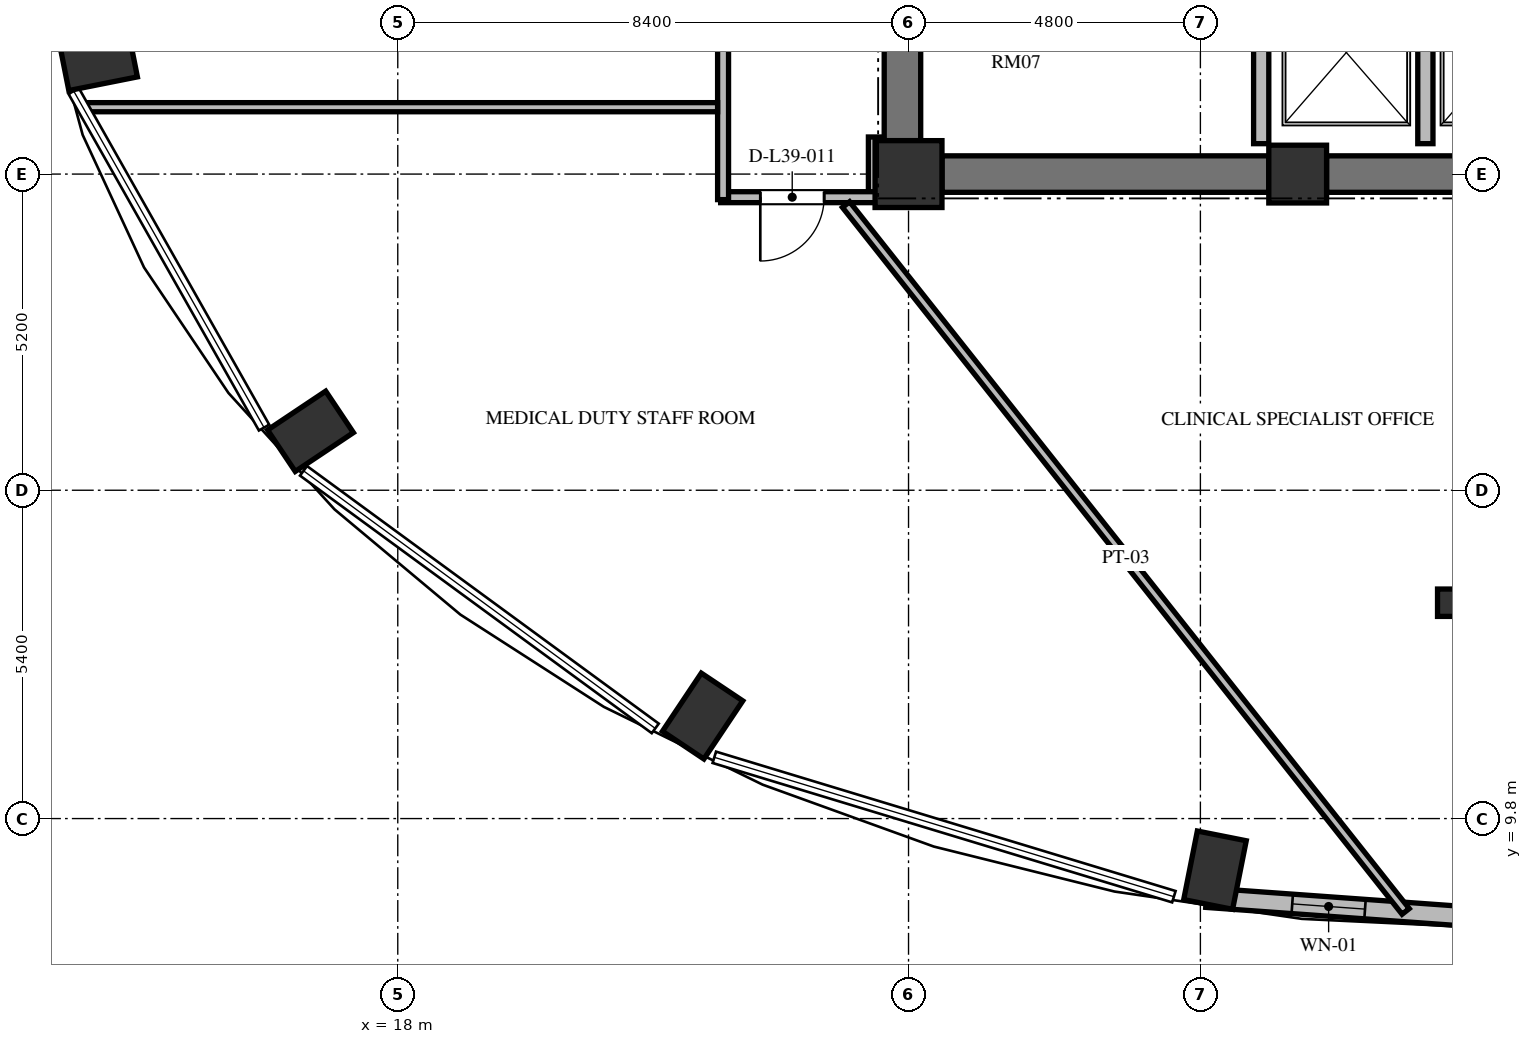
"""IFC4 building model, lengths in metres.
Left out: names, types, materials, properties, quantities, classifications, styles, units other than length and angle.
Written with IfcOpenShell. Run it as: python <this file> out.ifc"""

import sys

from ifc_helpers import new_model, si_unit, direction, frame, frame_2d, origin, origin_2d, place, context, subcontext, project, spatial, rectangle, extrude, element, fill, save


model = new_model("IFC4")
c1 = context("Model", 3, precision=1e-05, world=origin(), true_north=direction((0.0, 1.0)))
c2 = subcontext(c1, "Body", "Model", "MODEL_VIEW")
j1 = project(units=[si_unit("LENGTHUNIT", "METRE"), si_unit("PLANEANGLEUNIT", "RADIAN")], contexts=[c1])
p1 = place(None, origin())
s1 = spatial("IfcSite", under=j1, at=p1, CompositionType="ELEMENT")
p2 = place(p1, origin())
s2 = spatial("IfcBuilding", under=s1, at=p2, CompositionType="ELEMENT")
p3 = place(p2, frame((0.0, 0.0, 152.88)))
s3 = spatial("IfcBuildingStorey", under=s2, at=p3, CompositionType="ELEMENT", Elevation=152.88)
for number, where, z_axis, x_axis in (
    (1, (13.074, 22.288, 0.0), (0.0, 0.0, 1.0), (-0.981, -0.195, 0.0)),
    (2, (16.564, 16.169, 0.0), (0.0, 0.0, 1.0), (-0.831, -0.556, 0.0)),
    (3, (23.013, 11.486, 0.0), (0.0, 0.0, 1.0), (-0.556, -0.831, 0.0)),
    (4, (31.44, 8.951, 0.0), (0.0, 0.0, 1.0), (-0.195, -0.981, 0.0)),
):
    element("IfcColumn", number, at=place(p3, frame(where, z_axis=z_axis, x_axis=x_axis)), inside=s3, PredefinedType="COLUMN", context=c2, shape_type="SweptSolid", body=[
        extrude(rectangle(XDim=1.15, YDim=0.82, at=origin_2d()), origin(), (0.0, 0.0, 1.0), 3.648),
    ])
p4 = place(p3, frame((26.4, 20.4, 0.0), z_axis=(0.0, 0.0, 1.0), x_axis=(1.0, 0.0, 0.0)))
e5 = element("IfcColumn", 5, at=p4, inside=s3, PredefinedType="COLUMN", context=c2, shape_type="SweptSolid", body=[
    extrude(rectangle(XDim=1.1, YDim=1.1, at=origin_2d()), origin(), (0.0, 0.0, 1.0), 3.648),
])
p5 = place(p3, frame((32.8, 20.4, 0.0), z_axis=(0.0, 0.0, 1.0), x_axis=(1.0, 0.0, 0.0)))
e6 = element("IfcColumn", 6, at=p5, inside=s3, PredefinedType="COLUMN", context=c2, shape_type="SweptSolid", body=[
    extrude(rectangle(XDim=0.95, YDim=0.95, at=origin_2d()), origin(), (0.0, 0.0, 1.0), 3.648),
])
p6 = place(p3, frame((35.4, 13.35, 0.0), z_axis=(0.0, 0.0, 1.0), x_axis=(1.0, 0.0, 0.0)))
e7 = element("IfcColumn", 7, at=p6, inside=s3, PredefinedType="PILASTER", context=c2, shape_type="SweptSolid", body=[
    extrude(rectangle(XDim=0.6, YDim=0.45, at=origin_2d()), origin(), (0.0, 0.0, 1.0), 3.648),
])
p7 = place(p3, frame((26.3, 20.95, 0.0), z_axis=(0.0, 0.0, 1.0), x_axis=(0.0, 1.0, 0.0)))
e8 = element("IfcWall", 8, at=p7, inside=s3, PredefinedType="SHEAR", context=c2, shape_type="SweptSolid", body=[
    extrude(rectangle(XDim=14.1, YDim=0.6, at=frame_2d((7.05, 0.0))), origin(), (0.0, 0.0, 1.0), 3.648),
])
p8 = place(p7, frame((6.5, 0.0, 0.0)))
e9 = element("IfcOpeningElement", 9, at=p8, cuts=e8, PredefinedType="OPENING", context=c2, shape_type="SweptSolid", body=[
    extrude(rectangle(XDim=1.2, YDim=2.15, at=frame_2d((0.6, 1.075))), frame((0.0, 0.31, 0.0), z_axis=(0.0, -1.0, 0.0), x_axis=(1.0, 0.0, 0.0)), (0.0, 0.0, 1.0), 0.62),
])
p9 = place(p7, frame((9.6, 0.0, 0.0)))
e10 = element("IfcOpeningElement", 10, at=p9, cuts=e8, PredefinedType="OPENING", context=c2, shape_type="SweptSolid", body=[
    extrude(rectangle(XDim=1.3, YDim=2.2, at=frame_2d((0.65, 1.1))), frame((0.0, 0.31, 0.0), z_axis=(0.0, -1.0, 0.0), x_axis=(1.0, 0.0, 0.0)), (0.0, 0.0, 1.0), 0.62),
])
p10 = place(p7, frame((3.26, 0.0, 0.0)))
e11 = element("IfcOpeningElement", 11, at=p10, cuts=e8, PredefinedType="OPENING", context=c2, shape_type="SweptSolid", body=[
    extrude(rectangle(XDim=1.3, YDim=2.2, at=frame_2d((0.65, 1.1))), frame((0.0, 0.31, 0.0), z_axis=(0.0, -1.0, 0.0), x_axis=(1.0, 0.0, 0.0)), (0.0, 0.0, 1.0), 0.62),
])
p11 = place(p3, frame((26.95, 20.4, 0.0), z_axis=(0.0, 0.0, 1.0), x_axis=(1.0, 0.0, 0.0)))
e12 = element("IfcWall", 12, at=p11, inside=s3, PredefinedType="SHEAR", context=c2, shape_type="SweptSolid", body=[
    extrude(rectangle(XDim=5.375, YDim=0.6, at=frame_2d((2.688, 0.0))), origin(), (0.0, 0.0, 1.0), 3.648),
])
p12 = place(p3, frame((33.275, 20.4, 0.0), z_axis=(0.0, 0.0, 1.0), x_axis=(1.0, 0.0, 0.0)))
e13 = element("IfcWall", 13, at=p12, inside=s3, PredefinedType="SHEAR", context=c2, shape_type="SweptSolid", body=[
    extrude(rectangle(XDim=5.45, YDim=0.6, at=frame_2d((2.725, 0.0))), origin(), (0.0, 0.0, 1.0), 3.648),
])
p13 = place(p3, frame((31.299, 8.499, 0.0), z_axis=(0.0, 0.0, 1.0), x_axis=(0.997415202861, -0.071853413984, 0.0)))
e14 = element("IfcWall", 14, at=p13, inside=s3, PredefinedType="SOLIDWALL", context=c2, shape_type="SweptSolid", body=[
    extrude(rectangle(XDim=4.893, YDim=0.32, at=frame_2d((2.446, 0.0))), origin(), (0.0, 0.0, 1.0), 3.428),
])
p14 = place(p13, frame((1.415, 0.0, 0.85)))
e15 = element("IfcOpeningElement", 15, at=p14, cuts=e14, PredefinedType="OPENING", context=c2, shape_type="SweptSolid", body=[
    extrude(rectangle(XDim=1.2, YDim=2.2, at=frame_2d((0.6, 1.1))), frame((0.0, 0.17, 0.0), z_axis=(0.0, -1.0, 0.0), x_axis=(1.0, 0.0, 0.0)), (0.0, 0.0, 1.0), 0.34),
])
for number, where, z_axis, x_axis in (
    (16, (32.2, 20.9, 0.0), (0.0, 0.0, 1.0), (0.0, 1.0, 0.0)),
    (17, (34.9, 20.9, 0.0), (0.0, 0.0, 1.0), (0.0, 1.0, 0.0)),
):
    element("IfcWall", number, at=place(p3, frame(where, z_axis=z_axis, x_axis=x_axis)), inside=s3, PredefinedType="SOLIDWALL", context=c2, shape_type="SweptSolid", body=[
        extrude(rectangle(XDim=2.8, YDim=0.25, at=frame_2d((1.4, 0.0))), origin(), (0.0, 0.0, 1.0), 3.428),
    ])
p15 = place(p3, frame((25.83, 21.01, 0.0), z_axis=(0.0, 0.0, 1.0), x_axis=(0.0, -1.0, 0.0)))
e18 = element("IfcWall", 18, at=p15, inside=s3, PredefinedType="PARTITIONING", context=c2, shape_type="SweptSolid", body=[
    extrude(rectangle(XDim=1.03, YDim=0.18, at=frame_2d((0.515, 0.0))), origin(), (0.0, 0.0, 1.0), 3.428),
])
p16 = place(p3, frame((25.87, 20.02, 0.0), z_axis=(0.0, 0.0, 1.0), x_axis=(-1.0, 0.0, 0.0)))
e19 = element("IfcWall", 19, at=p16, inside=s3, PredefinedType="PARTITIONING", context=c2, shape_type="SweptSolid", body=[
    extrude(rectangle(XDim=2.56, YDim=0.18, at=frame_2d((1.28, 0.0))), origin(), (0.0, 0.0, 1.0), 3.428),
])
p17 = place(p16, frame((0.858, 0.0, 0.0)))
e20 = element("IfcOpeningElement", 20, at=p17, cuts=e19, PredefinedType="OPENING", context=c2, shape_type="SweptSolid", body=[
    extrude(rectangle(XDim=1.05, YDim=2.15, at=frame_2d((0.525, 1.075))), frame((0.0, 0.1, 0.0), z_axis=(0.0, -1.0, 0.0), x_axis=(1.0, 0.0, 0.0)), (0.0, 0.0, 1.0), 0.2),
])
p18 = place(p3, frame((23.35, 19.98, 0.0), z_axis=(0.0, 0.0, 1.0), x_axis=(0.0, 1.0, 0.0)))
e21 = element("IfcWall", 21, at=p18, inside=s3, PredefinedType="PARTITIONING", context=c2, shape_type="SweptSolid", body=[
    extrude(rectangle(XDim=5.06, YDim=0.18, at=frame_2d((2.53, 0.0))), origin(), (0.0, 0.0, 1.0), 3.428),
])
p19 = place(p3, frame((12.829, 21.5, 0.0), z_axis=(0.0, 0.0, 1.0), x_axis=(1.0, 0.0, 0.0)))
e22 = element("IfcWall", 22, at=p19, inside=s3, PredefinedType="PARTITIONING", context=c2, shape_type="SweptSolid", body=[
    extrude(rectangle(XDim=10.431, YDim=0.15, at=frame_2d((5.216, 0.0))), origin(), (0.0, 0.0, 1.0), 2.863),
])
p20 = place(p3, frame((25.372, 19.898, 0.0), z_axis=(0.0, 0.0, 1.0), x_axis=(0.620699148788, -0.784048829279, 0.0)))
e23 = element("IfcWall", 23, at=p20, inside=s3, PredefinedType="PARTITIONING", context=c2, shape_type="SweptSolid", body=[
    extrude(rectangle(XDim=14.828, YDim=0.15, at=frame_2d((7.414, 0.0))), origin(), (0.0, 0.0, 1.0), 3.428),
])
p21 = place(p14, origin())
e24 = element("IfcWindow", 24, at=p21, inside=s3, PartitioningType="SINGLE_PANEL", PredefinedType="WINDOW", context=c2, shape_type="SweptSolid", body=[
    extrude(rectangle(XDim=1.2, YDim=2.2, at=frame_2d((0.6, 1.1))), frame((0.0, 0.03, 0.0), z_axis=(0.0, -1.0, 0.0), x_axis=(1.0, 0.0, 0.0)), (0.0, 0.0, 1.0), 0.06),
])
fill(e15, e24)
p22 = place(p17, origin())
e25 = element("IfcDoor", 25, at=p22, inside=s3, OperationType="SINGLE_SWING_RIGHT", PredefinedType="DOOR", context=c2, shape_type="SweptSolid", body=[
    extrude(rectangle(XDim=1.05, YDim=2.15, at=frame_2d((0.525, 1.075))), frame((0.0, 0.025, 0.0), z_axis=(0.0, -1.0, 0.0), x_axis=(1.0, 0.0, 0.0)), (0.0, 0.0, 1.0), 0.05),
])
fill(e20, e25)
save(model, sys.argv[1])
